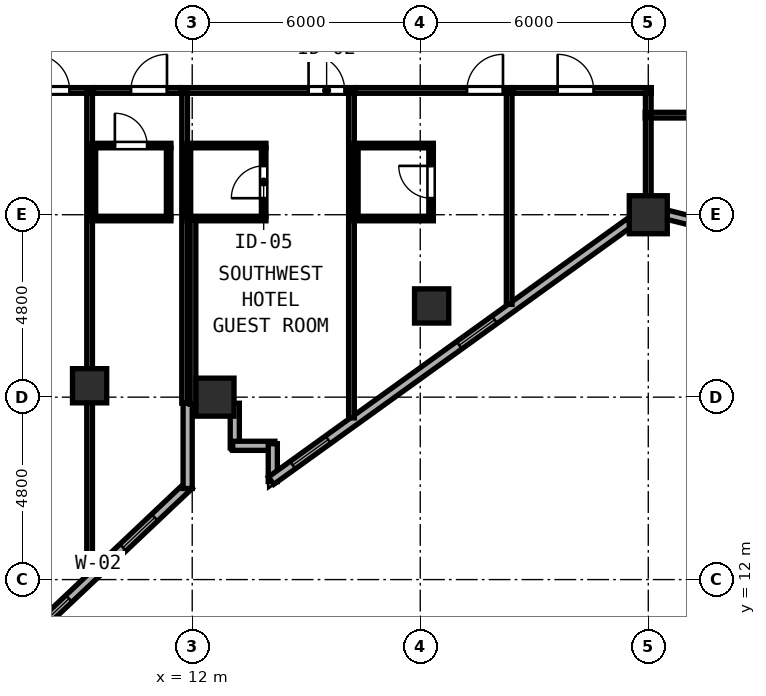
"""IFC4 building model, lengths in metres.
Left out: names, types, materials, properties, quantities, classifications, styles, units other than length and angle.
Written with IfcOpenShell. Run it as: python <this file> out.ifc"""

import sys

from ifc_helpers import new_model, si_unit, direction, frame, frame_2d, origin, origin_2d, place, context, subcontext, project, spatial, rectangle, hollow_rectangle, extrude, element, fill, save


model = new_model("IFC4")
c1 = context("Model", 3, precision=1e-05, world=origin(), true_north=direction((0.0, 1.0)))
c2 = subcontext(c1, "Body", "Model", "MODEL_VIEW")
j1 = project(units=[si_unit("LENGTHUNIT", "METRE"), si_unit("PLANEANGLEUNIT", "RADIAN")], contexts=[c1])
p1 = place(None, origin())
s1 = spatial("IfcSite", under=j1, at=p1, CompositionType="ELEMENT")
p2 = place(p1, origin())
s2 = spatial("IfcBuilding", under=s1, at=p2, CompositionType="ELEMENT")
p3 = place(p2, frame((0.0, 0.0, 128.8)))
s3 = spatial("IfcBuildingStorey", under=s2, at=p3, CompositionType="ELEMENT", Elevation=128.8)
for number, where, z_axis, x_axis in (
    (1, (24.0, 21.6, 0.0), (0.0, 0.0, 1.0), (1.0, 0.0, 0.0)),
    (2, (12.6, 16.8, 0.0), (0.0, 0.0, 1.0), (1.0, 0.0, 0.0)),
):
    element("IfcColumn", number, at=place(p3, frame(where, z_axis=z_axis, x_axis=x_axis)), inside=s3, PredefinedType="COLUMN", context=c2, shape_type="SweptSolid", body=[
        extrude(hollow_rectangle(XDim=1.0, YDim=1.0, WallThickness=0.038, at=origin_2d()), origin(), (0.0, 0.0, 1.0), 3.8),
    ])
for number, where, z_axis, x_axis in (
    (3, (18.3, 19.2, 0.0), (0.0, 0.0, 1.0), (1.0, 0.0, 0.0)),
    (4, (9.3, 17.1, 0.0), (0.0, 0.0, 1.0), (1.0, 0.0, 0.0)),
):
    element("IfcColumn", number, at=place(p3, frame(where, z_axis=z_axis, x_axis=x_axis)), inside=s3, PredefinedType="COLUMN", context=c2, shape_type="SweptSolid", body=[
        extrude(hollow_rectangle(XDim=0.9, YDim=0.9, WallThickness=0.034, at=origin_2d()), origin(), (0.0, 0.0, 1.0), 3.8),
    ])
p4 = place(p3, frame((13.12, 16.64, 0.0), z_axis=(0.0, 0.0, 1.0), x_axis=(0.0, -1.0, 0.0)))
e5 = element("IfcWall", 5, at=p4, inside=s3, PredefinedType="SOLIDWALL", context=c2, shape_type="SweptSolid", body=[
    extrude(rectangle(XDim=1.175, YDim=0.24, at=frame_2d((0.587, 0.0))), origin(), (0.0, 0.0, 1.0), 3.6),
])
p5 = place(p3, frame((13.065, 15.52, 0.0), z_axis=(0.0, 0.0, 1.0), x_axis=(1.0, 0.0, 0.0)))
e6 = element("IfcWall", 6, at=p5, inside=s3, PredefinedType="SOLIDWALL", context=c2, shape_type="SweptSolid", body=[
    extrude(rectangle(XDim=1.11, YDim=0.24, at=frame_2d((0.555, 0.0))), origin(), (0.0, 0.0, 1.0), 3.6),
])
p6 = place(p3, frame((14.12, 15.575, 0.0), z_axis=(0.0, 0.0, 1.0), x_axis=(0.0, -1.0, 0.0)))
e7 = element("IfcWall", 7, at=p6, inside=s3, PredefinedType="SOLIDWALL", context=c2, shape_type="SweptSolid", body=[
    extrude(rectangle(XDim=0.996, YDim=0.24, at=frame_2d((0.498, 0.0))), origin(), (0.0, 0.0, 1.0), 3.6),
])
p7 = place(p3, frame((14.075, 14.602, 0.0), z_axis=(0.0, 0.0, 1.0), x_axis=(0.811543504691, 0.584291998913, 0.0)))
e8 = element("IfcWall", 8, at=p7, inside=s3, PredefinedType="SOLIDWALL", context=c2, shape_type="SweptSolid", body=[
    extrude(rectangle(XDim=11.623, YDim=0.24, at=frame_2d((5.812, 0.0))), origin(), (0.0, 0.0, 1.0), 3.145),
])
p8 = place(p7, frame((0.7, 0.0, 0.85)))
e9 = element("IfcOpeningElement", 9, at=p8, cuts=e8, PredefinedType="OPENING", context=c2, shape_type="SweptSolid", body=[
    extrude(rectangle(XDim=1.15, YDim=1.8, at=frame_2d((0.575, 0.9))), frame((0.0, 0.13, 0.0), z_axis=(0.0, -1.0, 0.0), x_axis=(1.0, 0.0, 0.0)), (0.0, 0.0, 1.0), 0.26),
])
p9 = place(p7, frame((6.1, 0.0, 0.85)))
e10 = element("IfcOpeningElement", 10, at=p9, cuts=e8, PredefinedType="OPENING", context=c2, shape_type="SweptSolid", body=[
    extrude(rectangle(XDim=1.15, YDim=1.8, at=frame_2d((0.575, 0.9))), frame((0.0, 0.13, 0.0), z_axis=(0.0, -1.0, 0.0), x_axis=(1.0, 0.0, 0.0)), (0.0, 0.0, 1.0), 0.26),
])
p10 = place(p3, frame((24.492, 21.601, 0.0), z_axis=(0.0, 0.0, 1.0), x_axis=(0.970145683738, -0.242522890311, 0.0)))
e11 = element("IfcWall", 11, at=p10, inside=s3, PredefinedType="SOLIDWALL", context=c2, shape_type="SweptSolid", body=[
    extrude(rectangle(XDim=4.511, YDim=0.24, at=frame_2d((2.255, 0.0))), origin(), (0.0, 0.0, 1.0), 3.145),
])
p11 = place(p10, frame((0.7, 0.0, 0.85)))
e12 = element("IfcOpeningElement", 12, at=p11, cuts=e11, PredefinedType="OPENING", context=c2, shape_type="SweptSolid", body=[
    extrude(rectangle(XDim=1.15, YDim=1.8, at=frame_2d((0.575, 0.9))), frame((0.0, 0.13, 0.0), z_axis=(0.0, -1.0, 0.0), x_axis=(1.0, 0.0, 0.0)), (0.0, 0.0, 1.0), 0.26),
])
p12 = place(p3, frame((3.489, 6.518, 0.0), z_axis=(0.0, 0.0, 1.0), x_axis=(0.726640160789, 0.687018250652, 0.0)))
e13 = element("IfcWall", 13, at=p12, inside=s3, PredefinedType="SOLIDWALL", context=c2, shape_type="SweptSolid", body=[
    extrude(rectangle(XDim=11.603, YDim=0.24, at=frame_2d((5.801, 0.0))), origin(), (0.0, 0.0, 1.0), 3.6),
])
p13 = place(p12, frame((0.7, 0.0, 0.85)))
e14 = element("IfcOpeningElement", 14, at=p13, cuts=e13, PredefinedType="OPENING", context=c2, shape_type="SweptSolid", body=[
    extrude(rectangle(XDim=1.15, YDim=1.8, at=frame_2d((0.575, 0.9))), frame((0.0, 0.13, 0.0), z_axis=(0.0, -1.0, 0.0), x_axis=(1.0, 0.0, 0.0)), (0.0, 0.0, 1.0), 0.26),
])
p14 = place(p12, frame((6.1, 0.0, 0.85)))
e15 = element("IfcOpeningElement", 15, at=p14, cuts=e13, PredefinedType="OPENING", context=c2, shape_type="SweptSolid", body=[
    extrude(rectangle(XDim=1.15, YDim=1.8, at=frame_2d((0.575, 0.9))), frame((0.0, 0.13, 0.0), z_axis=(0.0, -1.0, 0.0), x_axis=(1.0, 0.0, 0.0)), (0.0, 0.0, 1.0), 0.26),
])
p15 = place(p12, frame((9.206, 0.0, 0.85)))
e16 = element("IfcOpeningElement", 16, at=p15, cuts=e13, PredefinedType="OPENING", context=c2, shape_type="SweptSolid", body=[
    extrude(rectangle(XDim=1.15, YDim=1.8, at=frame_2d((0.575, 0.9))), frame((0.0, 0.13, 0.0), z_axis=(0.0, -1.0, 0.0), x_axis=(1.0, 0.0, 0.0)), (0.0, 0.0, 1.0), 0.26),
])
p16 = place(p3, frame((11.88, 14.397, 0.0), z_axis=(0.0, 0.0, 1.0), x_axis=(0.0, 1.0, 0.0)))
e17 = element("IfcWall", 17, at=p16, inside=s3, PredefinedType="SOLIDWALL", context=c2, shape_type="SweptSolid", body=[
    extrude(rectangle(XDim=2.243, YDim=0.24, at=frame_2d((1.122, 0.0))), origin(), (0.0, 0.0, 1.0), 3.6),
])
p17 = place(p3, frame((23.92, 24.22, 0.0), z_axis=(0.0, 0.0, 1.0), x_axis=(1.0, 0.0, 0.0)))
e18 = element("IfcWall", 18, at=p17, inside=s3, PredefinedType="PARTITIONING", context=c2, shape_type="SweptSolid", body=[
    extrude(rectangle(XDim=14.56, YDim=0.15, at=frame_2d((7.28, 0.0))), origin(), (0.0, 0.0, 1.0), 3.6),
])
p18 = place(p17, frame((9.445, 0.0, 0.0), z_axis=(0.0, 0.0, 1.0), x_axis=(-1.0, 0.0, 0.0)))
e19 = element("IfcOpeningElement", 19, at=p18, cuts=e18, PredefinedType="OPENING", context=c2, shape_type="SweptSolid", body=[
    extrude(rectangle(XDim=0.95, YDim=2.12, at=frame_2d((0.475, 1.06))), frame((0.0, 0.085, 0.0), z_axis=(0.0, -1.0, 0.0), x_axis=(1.0, 0.0, 0.0)), (0.0, 0.0, 1.0), 0.17),
])
p19 = place(p3, frame((24.0, 21.819, 0.0), z_axis=(0.0, 0.0, 1.0), x_axis=(0.0, 1.0, 0.0)))
e20 = element("IfcWall", 20, at=p19, inside=s3, PredefinedType="PARTITIONING", context=c2, shape_type="SweptSolid", body=[
    extrude(rectangle(XDim=2.341, YDim=0.15, at=frame_2d((1.171, 0.0))), origin(), (0.0, 0.0, 1.0), 3.145),
])
p20 = place(p3, frame((11.7, 24.87, 0.0), z_axis=(0.0, 0.0, 1.0), x_axis=(1.0, 0.0, 0.0)))
e21 = element("IfcWall", 21, at=p20, inside=s3, PredefinedType="PARTITIONING", context=c2, shape_type="SweptSolid", body=[
    extrude(rectangle(XDim=4.59, YDim=0.15, at=frame_2d((2.295, 0.0))), origin(), (0.0, 0.0, 1.0), 3.235),
])
p21 = place(p20, frame((4.311, 0.0, 0.0), z_axis=(0.0, 0.0, 1.0), x_axis=(-1.0, 0.0, 0.0)))
e22 = element("IfcOpeningElement", 22, at=p21, cuts=e21, PredefinedType="OPENING", context=c2, shape_type="SweptSolid", body=[
    extrude(rectangle(XDim=0.95, YDim=2.15, at=frame_2d((0.475, 1.075))), frame((0.0, 0.085, 0.0), z_axis=(0.0, -1.0, 0.0), x_axis=(1.0, 0.0, 0.0)), (0.0, 0.0, 1.0), 0.17),
])
p22 = place(p3, frame((11.8, 16.642, 0.0), z_axis=(0.0, 0.0, 1.0), x_axis=(0.0, 1.0, 0.0)))
e23 = element("IfcWall", 23, at=p22, inside=s3, PredefinedType="PARTITIONING", context=c2, shape_type="SweptSolid", body=[
    extrude(rectangle(XDim=8.168, YDim=0.15, at=frame_2d((4.084, 0.0))), origin(), (0.0, 0.0, 1.0), 3.6),
])
p23 = place(p3, frame((16.19, 16.254, 0.0), z_axis=(0.0, 0.0, 1.0), x_axis=(0.0, 1.0, 0.0)))
e24 = element("IfcWall", 24, at=p23, inside=s3, PredefinedType="PARTITIONING", context=c2, shape_type="SweptSolid", body=[
    extrude(rectangle(XDim=8.556, YDim=0.15, at=frame_2d((4.278, 0.0))), origin(), (0.0, 0.0, 1.0), 3.6),
])
for number, where, z_axis, x_axis in (
    (25, (11.86, 23.42, 0.0), (0.0, 0.0, 1.0), (1.0, 0.0, 0.0)),
    (26, (11.86, 21.5, 0.0), (0.0, 0.0, 1.0), (1.0, 0.0, 0.0)),
):
    element("IfcWall", number, at=place(p3, frame(where, z_axis=z_axis, x_axis=x_axis)), inside=s3, PredefinedType="PARTITIONING", context=c2, shape_type="SweptSolid", body=[
        extrude(rectangle(XDim=2.08, YDim=0.12, at=frame_2d((1.04, 0.0))), origin(), (0.0, 0.0, 1.0), 3.6),
    ])
p24 = place(p3, frame((11.9, 21.545, 0.0), z_axis=(0.0, 0.0, 1.0), x_axis=(0.0, 1.0, 0.0)))
e27 = element("IfcWall", 27, at=p24, inside=s3, PredefinedType="PARTITIONING", context=c2, shape_type="SweptSolid", body=[
    extrude(rectangle(XDim=1.83, YDim=0.12, at=frame_2d((0.915, 0.0))), origin(), (0.0, 0.0, 1.0), 3.6),
])
p25 = place(p3, frame((13.88, 21.545, 0.0), z_axis=(0.0, 0.0, 1.0), x_axis=(0.0, 1.0, 0.0)))
e28 = element("IfcWall", 28, at=p25, inside=s3, PredefinedType="PARTITIONING", context=c2, shape_type="SweptSolid", body=[
    extrude(rectangle(XDim=1.83, YDim=0.12, at=frame_2d((0.915, 0.0))), origin(), (0.0, 0.0, 1.0), 3.6),
])
p26 = place(p25, frame((0.49, 0.0, 0.0)))
e29 = element("IfcOpeningElement", 29, at=p26, cuts=e28, PredefinedType="OPENING", context=c2, shape_type="SweptSolid", body=[
    extrude(rectangle(XDim=0.85, YDim=2.1, at=frame_2d((0.425, 1.05))), frame((0.0, 0.07, 0.0), z_axis=(0.0, -1.0, 0.0), x_axis=(1.0, 0.0, 0.0)), (0.0, 0.0, 1.0), 0.14),
])
p27 = place(p3, frame((16.292, 24.87, 0.0), z_axis=(0.0, 0.0, 1.0), x_axis=(1.0, 0.0, 0.0)))
e30 = element("IfcWall", 30, at=p27, inside=s3, PredefinedType="PARTITIONING", context=c2, shape_type="SweptSolid", body=[
    extrude(rectangle(XDim=4.148, YDim=0.15, at=frame_2d((2.074, 0.0))), origin(), (0.0, 0.0, 1.0), 3.235),
])
p28 = place(p27, frame((3.885, 0.0, 0.0), z_axis=(0.0, 0.0, 1.0), x_axis=(-1.0, 0.0, 0.0)))
e31 = element("IfcOpeningElement", 31, at=p28, cuts=e30, PredefinedType="OPENING", context=c2, shape_type="SweptSolid", body=[
    extrude(rectangle(XDim=0.95, YDim=2.15, at=frame_2d((0.475, 1.075))), frame((0.0, 0.085, 0.0), z_axis=(0.0, -1.0, 0.0), x_axis=(1.0, 0.0, 0.0)), (0.0, 0.0, 1.0), 0.17),
])
p29 = place(p3, frame((20.34, 19.242, 0.0), z_axis=(0.0, 0.0, 1.0), x_axis=(0.0, 1.0, 0.0)))
e32 = element("IfcWall", 32, at=p29, inside=s3, PredefinedType="PARTITIONING", context=c2, shape_type="SweptSolid", body=[
    extrude(rectangle(XDim=5.568, YDim=0.15, at=frame_2d((2.784, 0.0))), origin(), (0.0, 0.0, 1.0), 3.6),
])
for number, where, z_axis, x_axis in (
    (33, (16.25, 23.42, 0.0), (0.0, 0.0, 1.0), (1.0, 0.0, 0.0)),
    (34, (16.25, 21.5, 0.0), (0.0, 0.0, 1.0), (1.0, 0.0, 0.0)),
):
    element("IfcWall", number, at=place(p3, frame(where, z_axis=z_axis, x_axis=x_axis)), inside=s3, PredefinedType="PARTITIONING", context=c2, shape_type="SweptSolid", body=[
        extrude(rectangle(XDim=2.095, YDim=0.12, at=frame_2d((1.047, 0.0))), origin(), (0.0, 0.0, 1.0), 3.6),
    ])
p30 = place(p3, frame((16.305, 21.545, 0.0), z_axis=(0.0, 0.0, 1.0), x_axis=(0.0, 1.0, 0.0)))
e35 = element("IfcWall", 35, at=p30, inside=s3, PredefinedType="PARTITIONING", context=c2, shape_type="SweptSolid", body=[
    extrude(rectangle(XDim=1.83, YDim=0.12, at=frame_2d((0.915, 0.0))), origin(), (0.0, 0.0, 1.0), 3.6),
])
p31 = place(p3, frame((18.285, 21.545, 0.0), z_axis=(0.0, 0.0, 1.0), x_axis=(0.0, 1.0, 0.0)))
e36 = element("IfcWall", 36, at=p31, inside=s3, PredefinedType="PARTITIONING", context=c2, shape_type="SweptSolid", body=[
    extrude(rectangle(XDim=1.83, YDim=0.12, at=frame_2d((0.915, 0.0))), origin(), (0.0, 0.0, 1.0), 3.6),
])
p32 = place(p31, frame((0.49, 0.0, 0.0)))
e37 = element("IfcOpeningElement", 37, at=p32, cuts=e36, PredefinedType="OPENING", context=c2, shape_type="SweptSolid", body=[
    extrude(rectangle(XDim=0.85, YDim=2.1, at=frame_2d((0.425, 1.05))), frame((0.0, 0.07, 0.0), z_axis=(0.0, -1.0, 0.0), x_axis=(1.0, 0.0, 0.0)), (0.0, 0.0, 1.0), 0.14),
])
p33 = place(p3, frame((20.442, 24.87, 0.0), z_axis=(0.0, 0.0, 1.0), x_axis=(1.0, 0.0, 0.0)))
e38 = element("IfcWall", 38, at=p33, inside=s3, PredefinedType="PARTITIONING", context=c2, shape_type="SweptSolid", body=[
    extrude(rectangle(XDim=3.638, YDim=0.15, at=frame_2d((1.819, 0.0))), origin(), (0.0, 0.0, 1.0), 3.235),
])
p34 = place(p33, frame((2.123, 0.0, 0.0), z_axis=(0.0, 0.0, 1.0), x_axis=(-1.0, 0.0, 0.0)))
e39 = element("IfcOpeningElement", 39, at=p34, cuts=e38, PredefinedType="OPENING", context=c2, shape_type="SweptSolid", body=[
    extrude(rectangle(XDim=0.95, YDim=2.12, at=frame_2d((0.475, 1.06))), frame((0.0, 0.085, 0.0), z_axis=(0.0, -1.0, 0.0), x_axis=(1.0, 0.0, 0.0)), (0.0, 0.0, 1.0), 0.17),
])
p35 = place(p3, frame((24.0, 24.28, 0.0), z_axis=(0.0, 0.0, 1.0), x_axis=(0.0, 1.0, 0.0)))
e40 = element("IfcWall", 40, at=p35, inside=s3, PredefinedType="PARTITIONING", context=c2, shape_type="SweptSolid", body=[
    extrude(rectangle(XDim=0.53, YDim=0.15, at=frame_2d((0.265, 0.0))), origin(), (0.0, 0.0, 1.0), 3.145),
])
p36 = place(p3, frame((1.645, 24.87, 0.0), z_axis=(0.0, 0.0, 1.0), x_axis=(1.0, 0.0, 0.0)))
e41 = element("IfcWall", 41, at=p36, inside=s3, PredefinedType="PARTITIONING", context=c2, shape_type="SweptSolid", body=[
    extrude(rectangle(XDim=7.755, YDim=0.15, at=frame_2d((3.877, 0.0))), origin(), (0.0, 0.0, 1.0), 3.6),
])
p37 = place(p36, frame((7.13, 0.0, 0.0), z_axis=(0.0, 0.0, 1.0), x_axis=(-1.0, 0.0, 0.0)))
e42 = element("IfcOpeningElement", 42, at=p37, cuts=e41, PredefinedType="OPENING", context=c2, shape_type="SweptSolid", body=[
    extrude(rectangle(XDim=0.95, YDim=2.18, at=frame_2d((0.475, 1.09))), frame((0.0, 0.085, 0.0), z_axis=(0.0, -1.0, 0.0), x_axis=(1.0, 0.0, 0.0)), (0.0, 0.0, 1.0), 0.17),
])
p38 = place(p3, frame((9.3, 12.157, 0.0), z_axis=(0.0, 0.0, 1.0), x_axis=(0.0, 1.0, 0.0)))
e43 = element("IfcWall", 43, at=p38, inside=s3, PredefinedType="PARTITIONING", context=c2, shape_type="SweptSolid", body=[
    extrude(rectangle(XDim=12.653, YDim=0.15, at=frame_2d((6.327, 0.0))), origin(), (0.0, 0.0, 1.0), 3.6),
])
p39 = place(p3, frame((9.402, 24.87, 0.0), z_axis=(0.0, 0.0, 1.0), x_axis=(1.0, 0.0, 0.0)))
e44 = element("IfcWall", 44, at=p39, inside=s3, PredefinedType="PARTITIONING", context=c2, shape_type="SweptSolid", body=[
    extrude(rectangle(XDim=2.296, YDim=0.15, at=frame_2d((1.148, 0.0))), origin(), (0.0, 0.0, 1.0), 3.6),
])
p40 = place(p39, frame((1.934, 0.0, 0.0), z_axis=(0.0, 0.0, 1.0), x_axis=(-1.0, 0.0, 0.0)))
e45 = element("IfcOpeningElement", 45, at=p40, cuts=e44, PredefinedType="OPENING", context=c2, shape_type="SweptSolid", body=[
    extrude(rectangle(XDim=0.95, YDim=2.15, at=frame_2d((0.475, 1.075))), frame((0.0, 0.085, 0.0), z_axis=(0.0, -1.0, 0.0), x_axis=(1.0, 0.0, 0.0)), (0.0, 0.0, 1.0), 0.17),
])
p41 = place(p3, frame((12.02, 16.612, 0.0), z_axis=(0.0, 0.0, 1.0), x_axis=(0.0, 1.0, 0.0)))
e46 = element("IfcWall", 46, at=p41, inside=s3, PredefinedType="PARTITIONING", context=c2, shape_type="SweptSolid", body=[
    extrude(rectangle(XDim=4.843, YDim=0.15, at=frame_2d((2.421, 0.0))), origin(), (0.0, 0.0, 1.0), 3.6),
])
p42 = place(p3, frame((9.36, 23.42, 0.0), z_axis=(0.0, 0.0, 1.0), x_axis=(1.0, 0.0, 0.0)))
e47 = element("IfcWall", 47, at=p42, inside=s3, PredefinedType="PARTITIONING", context=c2, shape_type="SweptSolid", body=[
    extrude(rectangle(XDim=2.08, YDim=0.12, at=frame_2d((1.04, 0.0))), origin(), (0.0, 0.0, 1.0), 3.6),
])
p43 = place(p42, frame((1.455, 0.0, 0.0), z_axis=(0.0, 0.0, 1.0), x_axis=(-1.0, 0.0, 0.0)))
e48 = element("IfcOpeningElement", 48, at=p43, cuts=e47, PredefinedType="OPENING", context=c2, shape_type="SweptSolid", body=[
    extrude(rectangle(XDim=0.85, YDim=2.1, at=frame_2d((0.425, 1.05))), frame((0.0, 0.07, 0.0), z_axis=(0.0, -1.0, 0.0), x_axis=(1.0, 0.0, 0.0)), (0.0, 0.0, 1.0), 0.14),
])
p44 = place(p3, frame((9.36, 21.5, 0.0), z_axis=(0.0, 0.0, 1.0), x_axis=(1.0, 0.0, 0.0)))
e49 = element("IfcWall", 49, at=p44, inside=s3, PredefinedType="PARTITIONING", context=c2, shape_type="SweptSolid", body=[
    extrude(rectangle(XDim=2.08, YDim=0.12, at=frame_2d((1.04, 0.0))), origin(), (0.0, 0.0, 1.0), 3.6),
])
for number, where, z_axis, x_axis in (
    (50, (9.4, 21.545, 0.0), (0.0, 0.0, 1.0), (0.0, 1.0, 0.0)),
    (51, (11.38, 21.545, 0.0), (0.0, 0.0, 1.0), (0.0, 1.0, 0.0)),
):
    element("IfcWall", number, at=place(p3, frame(where, z_axis=z_axis, x_axis=x_axis)), inside=s3, PredefinedType="PARTITIONING", context=c2, shape_type="SweptSolid", body=[
        extrude(rectangle(XDim=1.83, YDim=0.12, at=frame_2d((0.915, 0.0))), origin(), (0.0, 0.0, 1.0), 3.6),
    ])
p45 = place(p8, origin())
e52 = element("IfcWindow", 52, at=p45, inside=s3, PartitioningType="SINGLE_PANEL", PredefinedType="WINDOW", context=c2, shape_type="SweptSolid", body=[
    extrude(rectangle(XDim=1.15, YDim=1.8, at=frame_2d((0.575, 0.9))), frame((0.0, 0.03, 0.0), z_axis=(0.0, -1.0, 0.0), x_axis=(1.0, 0.0, 0.0)), (0.0, 0.0, 1.0), 0.06),
])
fill(e9, e52)
p46 = place(p9, origin())
e53 = element("IfcWindow", 53, at=p46, inside=s3, PartitioningType="SINGLE_PANEL", PredefinedType="WINDOW", context=c2, shape_type="SweptSolid", body=[
    extrude(rectangle(XDim=1.15, YDim=1.8, at=frame_2d((0.575, 0.9))), frame((0.0, 0.03, 0.0), z_axis=(0.0, -1.0, 0.0), x_axis=(1.0, 0.0, 0.0)), (0.0, 0.0, 1.0), 0.06),
])
fill(e10, e53)
p47 = place(p14, origin())
e54 = element("IfcWindow", 54, at=p47, inside=s3, PartitioningType="SINGLE_PANEL", PredefinedType="WINDOW", context=c2, shape_type="SweptSolid", body=[
    extrude(rectangle(XDim=1.15, YDim=1.8, at=frame_2d((0.575, 0.9))), frame((0.0, 0.03, 0.0), z_axis=(0.0, -1.0, 0.0), x_axis=(1.0, 0.0, 0.0)), (0.0, 0.0, 1.0), 0.06),
])
fill(e15, e54)
p48 = place(p21, origin())
e55 = element("IfcDoor", 55, at=p48, inside=s3, OperationType="SINGLE_SWING_RIGHT", PredefinedType="DOOR", context=c2, shape_type="SweptSolid", body=[
    extrude(rectangle(XDim=0.95, YDim=2.15, at=frame_2d((0.475, 1.075))), frame((0.0, 0.025, 0.0), z_axis=(0.0, -1.0, 0.0), x_axis=(1.0, 0.0, 0.0)), (0.0, 0.0, 1.0), 0.05),
])
fill(e22, e55)
p49 = place(p26, origin())
e56 = element("IfcDoor", 56, at=p49, inside=s3, OperationType="SINGLE_SWING_LEFT", PredefinedType="DOOR", context=c2, shape_type="SweptSolid", body=[
    extrude(rectangle(XDim=0.85, YDim=2.1, at=frame_2d((0.425, 1.05))), frame((0.0, 0.025, 0.0), z_axis=(0.0, -1.0, 0.0), x_axis=(1.0, 0.0, 0.0)), (0.0, 0.0, 1.0), 0.05),
])
fill(e29, e56)
p50 = place(p28, origin())
e57 = element("IfcDoor", 57, at=p50, inside=s3, OperationType="SINGLE_SWING_LEFT", PredefinedType="DOOR", context=c2, shape_type="SweptSolid", body=[
    extrude(rectangle(XDim=0.95, YDim=2.15, at=frame_2d((0.475, 1.075))), frame((0.0, 0.025, 0.0), z_axis=(0.0, -1.0, 0.0), x_axis=(1.0, 0.0, 0.0)), (0.0, 0.0, 1.0), 0.05),
])
fill(e31, e57)
p51 = place(p32, origin())
e58 = element("IfcDoor", 58, at=p51, inside=s3, OperationType="SINGLE_SWING_RIGHT", PredefinedType="DOOR", context=c2, shape_type="SweptSolid", body=[
    extrude(rectangle(XDim=0.85, YDim=2.1, at=frame_2d((0.425, 1.05))), frame((0.0, 0.025, 0.0), z_axis=(0.0, -1.0, 0.0), x_axis=(1.0, 0.0, 0.0)), (0.0, 0.0, 1.0), 0.05),
])
fill(e37, e58)
p52 = place(p34, origin())
e59 = element("IfcDoor", 59, at=p52, inside=s3, OperationType="SINGLE_SWING_RIGHT", PredefinedType="DOOR", context=c2, shape_type="SweptSolid", body=[
    extrude(rectangle(XDim=0.95, YDim=2.12, at=frame_2d((0.475, 1.06))), frame((0.0, 0.025, 0.0), z_axis=(0.0, -1.0, 0.0), x_axis=(1.0, 0.0, 0.0)), (0.0, 0.0, 1.0), 0.05),
])
fill(e39, e59)
p53 = place(p37, origin())
e60 = element("IfcDoor", 60, at=p53, inside=s3, OperationType="SINGLE_SWING_RIGHT", PredefinedType="DOOR", context=c2, shape_type="SweptSolid", body=[
    extrude(rectangle(XDim=0.95, YDim=2.18, at=frame_2d((0.475, 1.09))), frame((0.0, 0.025, 0.0), z_axis=(0.0, -1.0, 0.0), x_axis=(1.0, 0.0, 0.0)), (0.0, 0.0, 1.0), 0.05),
])
fill(e42, e60)
p54 = place(p40, origin())
e61 = element("IfcDoor", 61, at=p54, inside=s3, OperationType="SINGLE_SWING_LEFT", PredefinedType="DOOR", context=c2, shape_type="SweptSolid", body=[
    extrude(rectangle(XDim=0.95, YDim=2.15, at=frame_2d((0.475, 1.075))), frame((0.0, 0.025, 0.0), z_axis=(0.0, -1.0, 0.0), x_axis=(1.0, 0.0, 0.0)), (0.0, 0.0, 1.0), 0.05),
])
fill(e45, e61)
p55 = place(p43, origin())
e62 = element("IfcDoor", 62, at=p55, inside=s3, OperationType="SINGLE_SWING_RIGHT", PredefinedType="DOOR", context=c2, shape_type="SweptSolid", body=[
    extrude(rectangle(XDim=0.85, YDim=2.1, at=frame_2d((0.425, 1.05))), frame((0.0, 0.025, 0.0), z_axis=(0.0, -1.0, 0.0), x_axis=(1.0, 0.0, 0.0)), (0.0, 0.0, 1.0), 0.05),
])
fill(e48, e62)
p56 = place(p15, origin())
e63 = element("IfcWindow", 63, at=p56, inside=s3, PartitioningType="SINGLE_PANEL", PredefinedType="WINDOW", context=c2, shape_type="SweptSolid", body=[
    extrude(rectangle(XDim=1.15, YDim=1.8, at=frame_2d((0.575, 0.9))), frame((0.0, 0.03, 0.0), z_axis=(0.0, -1.0, 0.0), x_axis=(1.0, 0.0, 0.0)), (0.0, 0.0, 1.0), 0.06),
])
fill(e16, e63)
save(model, sys.argv[1])
